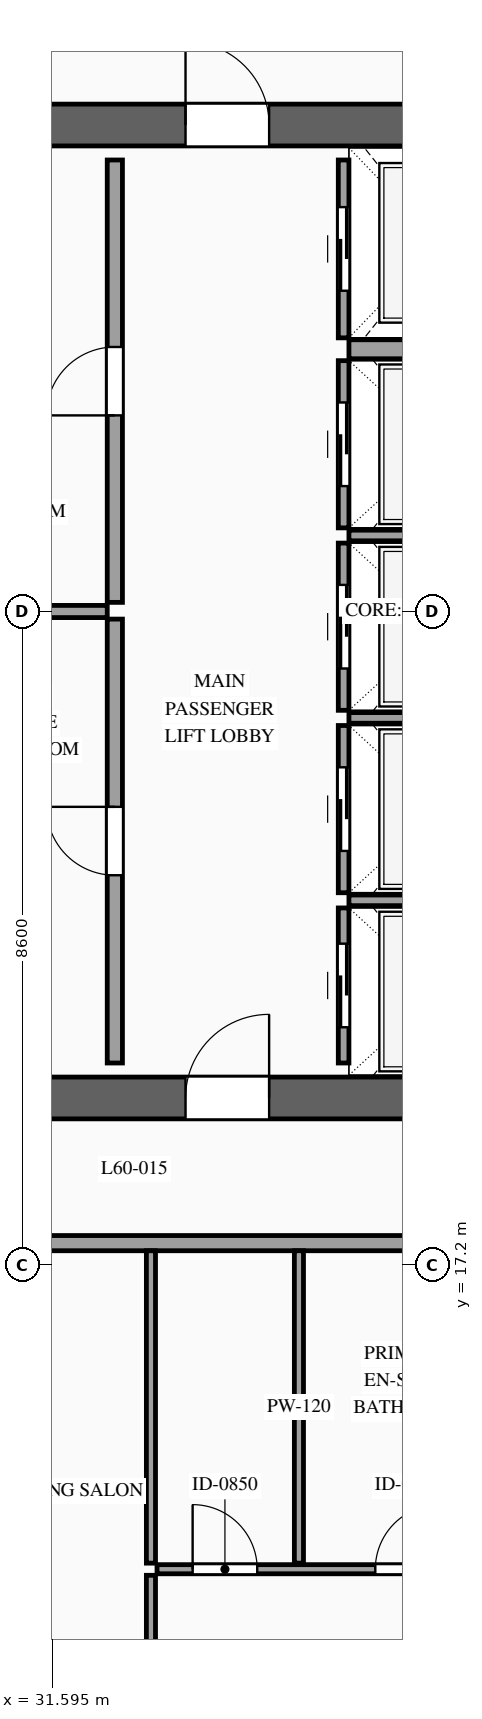
"""IFC4 building model, lengths in metres.
Left out: names, types, materials, properties, quantities, classifications, styles, units other than length and angle.
Written with IfcOpenShell. Run it as: python <this file> out.ifc"""

import sys

from ifc_helpers import new_model, si_unit, direction, frame, frame_2d, origin, place, context, subcontext, project, spatial, rectangle, extrude, source, transform, mapped, element, fill, save


model = new_model("IFC4")
c1 = context("Model", 3, precision=1e-05, world=origin(), true_north=direction((0.0, 1.0)))
c2 = subcontext(c1, "Body", "Model", "MODEL_VIEW")
j1 = project(units=[si_unit("LENGTHUNIT", "METRE"), si_unit("PLANEANGLEUNIT", "RADIAN")], contexts=[c1])
p1 = place(None, origin())
s1 = spatial("IfcSite", under=j1, at=p1, CompositionType="ELEMENT")
p2 = place(p1, origin())
s2 = spatial("IfcBuilding", under=s1, at=p2, CompositionType="ELEMENT")
p3 = place(p2, frame((0.0, 0.0, 227.6)))
s3 = spatial("IfcBuildingStorey", under=s2, at=p3, CompositionType="ELEMENT", Elevation=227.6)
p4 = place(p3, frame((23.525, 19.4, 0.0), z_axis=(0.0, 0.0, 1.0), x_axis=(1.0, 0.0, 0.0)))
e1 = element("IfcWall", 1, at=p4, inside=s3, PredefinedType="SHEAR", context=c2, shape_type="SweptSolid", body=[
    extrude(rectangle(XDim=26.95, YDim=0.55, at=frame_2d((13.475, 0.0))), origin(), (0.0, 0.0, 1.0), 3.5),
])
p5 = place(p4, frame((1.925, 0.0, 0.0)))
e2 = element("IfcOpeningElement", 2, at=p5, cuts=e1, PredefinedType="OPENING", context=c2, shape_type="SweptSolid", body=[
    extrude(rectangle(XDim=1.1, YDim=2.2, at=frame_2d((0.55, 1.1))), frame((0.0, 0.29, 0.0), z_axis=(0.0, -1.0, 0.0), x_axis=(1.0, 0.0, 0.0)), (0.0, 0.0, 1.0), 0.58),
])
p6 = place(p4, frame((9.825, 0.0, 0.0)))
e3 = element("IfcOpeningElement", 3, at=p6, cuts=e1, PredefinedType="OPENING", context=c2, shape_type="SweptSolid", body=[
    extrude(rectangle(XDim=1.1, YDim=2.2, at=frame_2d((0.55, 1.1))), frame((0.0, 0.29, 0.0), z_axis=(0.0, -1.0, 0.0), x_axis=(1.0, 0.0, 0.0)), (0.0, 0.0, 1.0), 0.58),
])
p7 = place(p4, frame((23.025, 0.0, 0.0)))
e4 = element("IfcOpeningElement", 4, at=p7, cuts=e1, PredefinedType="OPENING", context=c2, shape_type="SweptSolid", body=[
    extrude(rectangle(XDim=1.1, YDim=2.2, at=frame_2d((0.55, 1.1))), frame((0.0, 0.29, 0.0), z_axis=(0.0, -1.0, 0.0), x_axis=(1.0, 0.0, 0.0)), (0.0, 0.0, 1.0), 0.58),
])
p8 = place(p4, frame((19.645, 0.0, 0.0)))
e5 = element("IfcOpeningElement", 5, at=p8, cuts=e1, PredefinedType="OPENING", context=c2, shape_type="SweptSolid", body=[
    extrude(rectangle(XDim=0.9, YDim=2.15, at=frame_2d((0.45, 1.075))), frame((0.0, 0.29, 0.0), z_axis=(0.0, -1.0, 0.0), x_axis=(1.0, 0.0, 0.0)), (0.0, 0.0, 1.0), 0.58),
])
p9 = place(p4, frame((18.205, 0.0, 0.0)))
e6 = element("IfcOpeningElement", 6, at=p9, cuts=e1, PredefinedType="OPENING", context=c2, shape_type="SweptSolid", body=[
    extrude(rectangle(XDim=0.9, YDim=2.15, at=frame_2d((0.45, 1.075))), frame((0.0, 0.29, 0.0), z_axis=(0.0, -1.0, 0.0), x_axis=(1.0, 0.0, 0.0)), (0.0, 0.0, 1.0), 0.58),
])
p10 = place(p3, frame((23.525, 32.2, 0.0), z_axis=(0.0, 0.0, 1.0), x_axis=(1.0, 0.0, 0.0)))
e7 = element("IfcWall", 7, at=p10, inside=s3, PredefinedType="SHEAR", context=c2, shape_type="SweptSolid", body=[
    extrude(rectangle(XDim=26.95, YDim=0.55, at=frame_2d((13.475, 0.0))), origin(), (0.0, 0.0, 1.0), 3.5),
])
p11 = place(p10, frame((4.545, 0.0, 0.0)))
e8 = element("IfcOpeningElement", 8, at=p11, cuts=e7, PredefinedType="OPENING", context=c2, shape_type="SweptSolid", body=[
    extrude(rectangle(XDim=0.9, YDim=2.15, at=frame_2d((0.45, 1.075))), frame((0.0, 0.29, 0.0), z_axis=(0.0, -1.0, 0.0), x_axis=(1.0, 0.0, 0.0)), (0.0, 0.0, 1.0), 0.58),
])
p12 = place(p10, frame((9.825, 0.0, 0.0)))
e9 = element("IfcOpeningElement", 9, at=p12, cuts=e7, PredefinedType="OPENING", context=c2, shape_type="SweptSolid", body=[
    extrude(rectangle(XDim=1.1, YDim=2.2, at=frame_2d((0.55, 1.1))), frame((0.0, 0.29, 0.0), z_axis=(0.0, -1.0, 0.0), x_axis=(1.0, 0.0, 0.0)), (0.0, 0.0, 1.0), 0.58),
])
p13 = place(p10, frame((15.675, 0.0, 0.0)))
e10 = element("IfcOpeningElement", 10, at=p13, cuts=e7, PredefinedType="OPENING", context=c2, shape_type="SweptSolid", body=[
    extrude(rectangle(XDim=1.1, YDim=2.2, at=frame_2d((0.55, 1.1))), frame((0.0, 0.29, 0.0), z_axis=(0.0, -1.0, 0.0), x_axis=(1.0, 0.0, 0.0)), (0.0, 0.0, 1.0), 0.58),
])
p14 = place(p10, frame((19.645, 0.0, 0.0)))
e11 = element("IfcOpeningElement", 11, at=p14, cuts=e7, PredefinedType="OPENING", context=c2, shape_type="SweptSolid", body=[
    extrude(rectangle(XDim=0.9, YDim=2.15, at=frame_2d((0.45, 1.075))), frame((0.0, 0.29, 0.0), z_axis=(0.0, -1.0, 0.0), x_axis=(1.0, 0.0, 0.0)), (0.0, 0.0, 1.0), 0.58),
])
p15 = place(p3, frame((35.43, 19.86, 0.0), z_axis=(0.0, 0.0, 1.0), x_axis=(0.0, 1.0, 0.0)))
e12 = element("IfcWall", 12, at=p15, inside=s3, PredefinedType="SOLIDWALL", context=c2, shape_type="SweptSolid", body=[
    extrude(rectangle(XDim=2.04, YDim=0.14, at=frame_2d((1.02, 0.0))), origin(), (0.0, 0.0, 1.0), 3.28),
])
p16 = place(p15, frame((0.47, 0.0, 0.0)))
e13 = element("IfcOpeningElement", 13, at=p16, cuts=e12, PredefinedType="OPENING", context=c2, shape_type="SweptSolid", body=[
    extrude(rectangle(XDim=1.1, YDim=2.2, at=frame_2d((0.55, 1.1))), frame((0.0, 0.085, 0.0), z_axis=(0.0, -1.0, 0.0), x_axis=(1.0, 0.0, 0.0)), (0.0, 0.0, 1.0), 0.17),
])
m1 = source(origin(), c2, "Body", "SweptSolid", [
    extrude(rectangle(XDim=2.4, YDim=0.14, at=frame_2d((1.2, 0.0))), origin(), (0.0, 0.0, 1.0), 3.28),
])
p17 = place(p3, frame((35.5, 22.0, 0.0), z_axis=(0.0, 0.0, 1.0), x_axis=(1.0, 0.0, 0.0)))
e14 = element("IfcWall", 14, at=p17, inside=s3, PredefinedType="SOLIDWALL", context=c2, shape_type="MappedRepresentation", body=[
    mapped(m1, transform((0.0, 0.0, 0.0), scale=1.0)),
])
p18 = place(p3, frame((35.43, 22.1, 0.0), z_axis=(0.0, 0.0, 1.0), x_axis=(0.0, 1.0, 0.0)))
e15 = element("IfcWall", 15, at=p18, inside=s3, PredefinedType="SOLIDWALL", context=c2, shape_type="SweptSolid", body=[
    extrude(rectangle(XDim=2.2, YDim=0.14, at=frame_2d((1.1, 0.0))), origin(), (0.0, 0.0, 1.0), 3.28),
])
p19 = place(p18, frame((0.55, 0.0, 0.0)))
e16 = element("IfcOpeningElement", 16, at=p19, cuts=e15, PredefinedType="OPENING", context=c2, shape_type="SweptSolid", body=[
    extrude(rectangle(XDim=1.1, YDim=2.2, at=frame_2d((0.55, 1.1))), frame((0.0, 0.085, 0.0), z_axis=(0.0, -1.0, 0.0), x_axis=(1.0, 0.0, 0.0)), (0.0, 0.0, 1.0), 0.17),
])
p20 = place(p3, frame((35.5, 24.4, 0.0), z_axis=(0.0, 0.0, 1.0), x_axis=(1.0, 0.0, 0.0)))
e17 = element("IfcWall", 17, at=p20, inside=s3, PredefinedType="SOLIDWALL", context=c2, shape_type="MappedRepresentation", body=[
    mapped(m1, transform((0.0, 0.0, 0.0), scale=1.0)),
])
p21 = place(p3, frame((35.43, 24.5, 0.0), z_axis=(0.0, 0.0, 1.0), x_axis=(0.0, 1.0, 0.0)))
e18 = element("IfcWall", 18, at=p21, inside=s3, PredefinedType="SOLIDWALL", context=c2, shape_type="SweptSolid", body=[
    extrude(rectangle(XDim=2.2, YDim=0.14, at=frame_2d((1.1, 0.0))), origin(), (0.0, 0.0, 1.0), 3.28),
])
p22 = place(p21, frame((0.55, 0.0, 0.0)))
e19 = element("IfcOpeningElement", 19, at=p22, cuts=e18, PredefinedType="OPENING", context=c2, shape_type="SweptSolid", body=[
    extrude(rectangle(XDim=1.1, YDim=2.2, at=frame_2d((0.55, 1.1))), frame((0.0, 0.085, 0.0), z_axis=(0.0, -1.0, 0.0), x_axis=(1.0, 0.0, 0.0)), (0.0, 0.0, 1.0), 0.17),
])
p23 = place(p3, frame((35.5, 26.8, 0.0), z_axis=(0.0, 0.0, 1.0), x_axis=(1.0, 0.0, 0.0)))
e20 = element("IfcWall", 20, at=p23, inside=s3, PredefinedType="SOLIDWALL", context=c2, shape_type="MappedRepresentation", body=[
    mapped(m1, transform((0.0, 0.0, 0.0), scale=1.0)),
])
p24 = place(p3, frame((35.43, 26.9, 0.0), z_axis=(0.0, 0.0, 1.0), x_axis=(0.0, 1.0, 0.0)))
e21 = element("IfcWall", 21, at=p24, inside=s3, PredefinedType="SOLIDWALL", context=c2, shape_type="SweptSolid", body=[
    extrude(rectangle(XDim=2.2, YDim=0.14, at=frame_2d((1.1, 0.0))), origin(), (0.0, 0.0, 1.0), 3.28),
])
p25 = place(p24, frame((0.55, 0.0, 0.0)))
e22 = element("IfcOpeningElement", 22, at=p25, cuts=e21, PredefinedType="OPENING", context=c2, shape_type="SweptSolid", body=[
    extrude(rectangle(XDim=1.1, YDim=2.2, at=frame_2d((0.55, 1.1))), frame((0.0, 0.085, 0.0), z_axis=(0.0, -1.0, 0.0), x_axis=(1.0, 0.0, 0.0)), (0.0, 0.0, 1.0), 0.17),
])
p26 = place(p3, frame((35.43, 29.4, 0.0), z_axis=(0.0, 0.0, 1.0), x_axis=(0.0, 1.0, 0.0)))
e23 = element("IfcWall", 23, at=p26, inside=s3, PredefinedType="SOLIDWALL", context=c2, shape_type="SweptSolid", body=[
    extrude(rectangle(XDim=2.34, YDim=0.14, at=frame_2d((1.17, 0.0))), origin(), (0.0, 0.0, 1.0), 3.28),
])
p27 = place(p26, frame((0.62, 0.0, 0.0)))
e24 = element("IfcOpeningElement", 24, at=p27, cuts=e23, PredefinedType="OPENING", context=c2, shape_type="SweptSolid", body=[
    extrude(rectangle(XDim=1.1, YDim=2.2, at=frame_2d((0.55, 1.1))), frame((0.0, 0.085, 0.0), z_axis=(0.0, -1.0, 0.0), x_axis=(1.0, 0.0, 0.0)), (0.0, 0.0, 1.0), 0.17),
])
m2 = source(origin(), c2, "Body", "SweptSolid", [
    extrude(rectangle(XDim=2.4, YDim=0.25, at=frame_2d((1.2, 0.0))), origin(), (0.0, 0.0, 1.0), 3.28),
])
p28 = place(p3, frame((35.5, 29.25, 0.0), z_axis=(0.0, 0.0, 1.0), x_axis=(1.0, 0.0, 0.0)))
e25 = element("IfcWall", 25, at=p28, inside=s3, PredefinedType="SOLIDWALL", context=c2, shape_type="MappedRepresentation", body=[
    mapped(m2, transform((0.0, 0.0, 0.0), scale=1.0)),
])
p29 = place(p3, frame((32.42, 19.86, 0.0), z_axis=(0.0, 0.0, 1.0), x_axis=(0.0, 1.0, 0.0)))
e26 = element("IfcWall", 26, at=p29, inside=s3, PredefinedType="PARTITIONING", context=c2, shape_type="SweptSolid", body=[
    extrude(rectangle(XDim=5.84, YDim=0.2, at=frame_2d((2.92, 0.0))), origin(), (0.0, 0.0, 1.0), 3.28),
])
p30 = place(p29, frame((2.47, 0.0, 0.0)))
e27 = element("IfcOpeningElement", 27, at=p30, cuts=e26, PredefinedType="OPENING", context=c2, shape_type="SweptSolid", body=[
    extrude(rectangle(XDim=0.9, YDim=2.15, at=frame_2d((0.45, 1.075))), frame((0.0, 0.115, 0.0), z_axis=(0.0, -1.0, 0.0), x_axis=(1.0, 0.0, 0.0)), (0.0, 0.0, 1.0), 0.23),
])
p31 = place(p3, frame((32.42, 25.92, 0.0), z_axis=(0.0, 0.0, 1.0), x_axis=(0.0, 1.0, 0.0)))
e28 = element("IfcWall", 28, at=p31, inside=s3, PredefinedType="PARTITIONING", context=c2, shape_type="SweptSolid", body=[
    extrude(rectangle(XDim=5.82, YDim=0.2, at=frame_2d((2.91, 0.0))), origin(), (0.0, 0.0, 1.0), 3.28),
])
p32 = place(p31, frame((2.46, 0.0, 0.0)))
e29 = element("IfcOpeningElement", 29, at=p32, cuts=e28, PredefinedType="OPENING", context=c2, shape_type="SweptSolid", body=[
    extrude(rectangle(XDim=0.9, YDim=2.15, at=frame_2d((0.45, 1.075))), frame((0.0, 0.115, 0.0), z_axis=(0.0, -1.0, 0.0), x_axis=(1.0, 0.0, 0.0)), (0.0, 0.0, 1.0), 0.23),
])
m3 = source(origin(), c2, "Body", "SweptSolid", [
    extrude(rectangle(XDim=2.47, YDim=0.16, at=frame_2d((1.235, 0.0))), origin(), (0.0, 0.0, 1.0), 3.28),
])
p33 = place(p3, frame((29.85, 25.8, 0.0), z_axis=(0.0, 0.0, 1.0), x_axis=(1.0, 0.0, 0.0)))
e30 = element("IfcWall", 30, at=p33, inside=s3, PredefinedType="PARTITIONING", context=c2, shape_type="MappedRepresentation", body=[
    mapped(m3, transform((0.0, 0.0, 0.0), scale=1.0)),
])
p34 = place(p3, frame((19.44, 17.49, 0.0), z_axis=(0.0, 0.0, 1.0), x_axis=(1.0, 0.0, 0.0)))
e31 = element("IfcWall", 31, at=p34, inside=s3, PredefinedType="PARTITIONING", context=c2, shape_type="SweptSolid", body=[
    extrude(rectangle(XDim=18.182, YDim=0.2, at=frame_2d((9.091, 0.0))), origin(), (0.0, 0.0, 1.0), 3.28),
])
p35 = place(p34, frame((10.528, 0.0, 0.0)))
e32 = element("IfcOpeningElement", 32, at=p35, cuts=e31, PredefinedType="OPENING", context=c2, shape_type="SweptSolid", body=[
    extrude(rectangle(XDim=1.0, YDim=2.2, at=frame_2d((0.5, 1.1))), frame((0.0, 0.115, 0.0), z_axis=(0.0, -1.0, 0.0), x_axis=(1.0, 0.0, 0.0)), (0.0, 0.0, 1.0), 0.23),
])
m4 = source(origin(), c2, "Body", "SweptSolid", [
    extrude(rectangle(XDim=4.11, YDim=0.12, at=frame_2d((2.055, 0.0))), origin(), (0.0, 0.0, 1.0), 3.28),
])
for number, where, z_axis, x_axis in (
    (33, (34.842, 13.28, 0.0), (0.0, 0.0, 1.0), (0.0, 1.0, 0.0)),
    (34, (32.895, 13.28, 0.0), (0.0, 0.0, 1.0), (0.0, 1.0, 0.0)),
):
    element("IfcWall", number, at=place(p3, frame(where, z_axis=z_axis, x_axis=x_axis)), inside=s3, PredefinedType="PARTITIONING", context=c2, shape_type="MappedRepresentation", body=[
        mapped(m4, transform((0.0, 0.0, 0.0), scale=1.0)),
    ])
p36 = place(p3, frame((32.975, 13.2, 0.0), z_axis=(0.0, 0.0, 1.0), x_axis=(1.0, 0.0, 0.0)))
e35 = element("IfcWall", 35, at=p36, inside=s3, PredefinedType="PARTITIONING", context=c2, shape_type="SweptSolid", body=[
    extrude(rectangle(XDim=4.647, YDim=0.12, at=frame_2d((2.323, 0.0))), origin(), (0.0, 0.0, 1.0), 3.28),
])
p37 = place(p36, frame((2.872, 0.0, 0.0)))
e36 = element("IfcOpeningElement", 36, at=p37, cuts=e35, PredefinedType="OPENING", context=c2, shape_type="SweptSolid", body=[
    extrude(rectangle(XDim=0.85, YDim=2.1, at=frame_2d((0.425, 1.05))), frame((0.0, 0.075, 0.0), z_axis=(0.0, -1.0, 0.0), x_axis=(1.0, 0.0, 0.0)), (0.0, 0.0, 1.0), 0.15),
])
p38 = place(p36, frame((0.469, 0.0, 0.0)))
e37 = element("IfcOpeningElement", 37, at=p38, cuts=e35, PredefinedType="OPENING", context=c2, shape_type="SweptSolid", body=[
    extrude(rectangle(XDim=0.85, YDim=2.1, at=frame_2d((0.425, 1.05))), frame((0.0, 0.075, 0.0), z_axis=(0.0, -1.0, 0.0), x_axis=(1.0, 0.0, 0.0)), (0.0, 0.0, 1.0), 0.15),
])
p39 = place(p3, frame((32.895, 5.35, 0.0), z_axis=(0.0, 0.0, 1.0), x_axis=(0.0, 1.0, 0.0)))
e38 = element("IfcWall", 38, at=p39, inside=s3, PredefinedType="PARTITIONING", context=c2, shape_type="SweptSolid", body=[
    extrude(rectangle(XDim=7.77, YDim=0.12, at=frame_2d((3.885, 0.0))), origin(), (0.0, 0.0, 1.0), 3.28),
])
p40 = place(p39, frame((3.435, 0.0, 0.0)))
e39 = element("IfcOpeningElement", 39, at=p40, cuts=e38, PredefinedType="OPENING", context=c2, shape_type="SweptSolid", body=[
    extrude(rectangle(XDim=0.9, YDim=2.15, at=frame_2d((0.45, 1.075))), frame((0.0, 0.075, 0.0), z_axis=(0.0, -1.0, 0.0), x_axis=(1.0, 0.0, 0.0)), (0.0, 0.0, 1.0), 0.15),
])
m5 = source(origin(), c2, "Body", "SweptSolid", [
    extrude(rectangle(XDim=1.1, YDim=2.2, at=frame_2d((0.55, 1.1))), frame((0.0, 0.025, 0.0), z_axis=(0.0, -1.0, 0.0), x_axis=(1.0, 0.0, 0.0)), (0.0, 0.0, 1.0), 0.05),
])
p41 = place(p16, origin())
e40 = element("IfcDoor", 40, at=p41, inside=s3, OperationType="SLIDING_TO_RIGHT", PredefinedType="DOOR", context=c2, shape_type="MappedRepresentation", body=[
    mapped(m5, transform((0.0, 0.0, 0.0), scale=1.0)),
])
fill(e13, e40)
p42 = place(p19, origin())
e41 = element("IfcDoor", 41, at=p42, inside=s3, OperationType="SLIDING_TO_LEFT", PredefinedType="DOOR", context=c2, shape_type="MappedRepresentation", body=[
    mapped(m5, transform((0.0, 0.0, 0.0), scale=1.0)),
])
fill(e16, e41)
p43 = place(p22, origin())
e42 = element("IfcDoor", 42, at=p43, inside=s3, OperationType="SLIDING_TO_RIGHT", PredefinedType="DOOR", context=c2, shape_type="MappedRepresentation", body=[
    mapped(m5, transform((0.0, 0.0, 0.0), scale=1.0)),
])
fill(e19, e42)
p44 = place(p25, origin())
e43 = element("IfcDoor", 43, at=p44, inside=s3, OperationType="SLIDING_TO_LEFT", PredefinedType="DOOR", context=c2, shape_type="MappedRepresentation", body=[
    mapped(m5, transform((0.0, 0.0, 0.0), scale=1.0)),
])
fill(e22, e43)
p45 = place(p27, origin())
e44 = element("IfcDoor", 44, at=p45, inside=s3, OperationType="SLIDING_TO_RIGHT", PredefinedType="DOOR", context=c2, shape_type="MappedRepresentation", body=[
    mapped(m5, transform((0.0, 0.0, 0.0), scale=1.0)),
])
fill(e24, e44)
m6 = source(origin(), c2, "Body", "SweptSolid", [
    extrude(rectangle(XDim=1.1, YDim=2.2, at=frame_2d((0.55, 1.1))), frame((0.0, 0.025, 0.0), z_axis=(0.0, -1.0, 0.0), x_axis=(1.0, 0.0, 0.0)), (0.0, 0.0, 1.0), 0.05),
])
p46 = place(p6, origin())
e45 = element("IfcDoor", 45, at=p46, inside=s3, OperationType="SINGLE_SWING_RIGHT", PredefinedType="DOOR", context=c2, shape_type="MappedRepresentation", body=[
    mapped(m6, transform((0.0, 0.0, 0.0), scale=1.0)),
])
fill(e3, e45)
p47 = place(p12, origin())
e46 = element("IfcDoor", 46, at=p47, inside=s3, OperationType="SINGLE_SWING_LEFT", PredefinedType="DOOR", context=c2, shape_type="MappedRepresentation", body=[
    mapped(m6, transform((0.0, 0.0, 0.0), scale=1.0)),
])
fill(e9, e46)
m7 = source(origin(), c2, "Body", "SweptSolid", [
    extrude(rectangle(XDim=0.9, YDim=2.15, at=frame_2d((0.45, 1.075))), frame((0.0, 0.025, 0.0), z_axis=(0.0, -1.0, 0.0), x_axis=(1.0, 0.0, 0.0)), (0.0, 0.0, 1.0), 0.05),
])
p48 = place(p30, origin())
e47 = element("IfcDoor", 47, at=p48, inside=s3, OperationType="SINGLE_SWING_RIGHT", PredefinedType="DOOR", context=c2, shape_type="MappedRepresentation", body=[
    mapped(m7, transform((0.0, 0.0, 0.0), scale=1.0)),
])
fill(e27, e47)
p49 = place(p32, origin())
e48 = element("IfcDoor", 48, at=p49, inside=s3, OperationType="SINGLE_SWING_LEFT", PredefinedType="DOOR", context=c2, shape_type="MappedRepresentation", body=[
    mapped(m7, transform((0.0, 0.0, 0.0), scale=1.0)),
])
fill(e29, e48)
m8 = source(origin(), c2, "Body", "SweptSolid", [
    extrude(rectangle(XDim=0.85, YDim=2.1, at=frame_2d((0.425, 1.05))), frame((0.0, 0.025, 0.0), z_axis=(0.0, -1.0, 0.0), x_axis=(1.0, 0.0, 0.0)), (0.0, 0.0, 1.0), 0.05),
])
p50 = place(p37, origin())
e49 = element("IfcDoor", 49, at=p50, inside=s3, OperationType="SINGLE_SWING_RIGHT", PredefinedType="DOOR", context=c2, shape_type="MappedRepresentation", body=[
    mapped(m8, transform((0.0, 0.0, 0.0), scale=1.0)),
])
fill(e36, e49)
p51 = place(p38, origin())
e50 = element("IfcDoor", 50, at=p51, inside=s3, OperationType="SINGLE_SWING_LEFT", PredefinedType="DOOR", context=c2, shape_type="MappedRepresentation", body=[
    mapped(m8, transform((0.0, 0.0, 0.0), scale=1.0)),
])
fill(e37, e50)
save(model, sys.argv[1])
